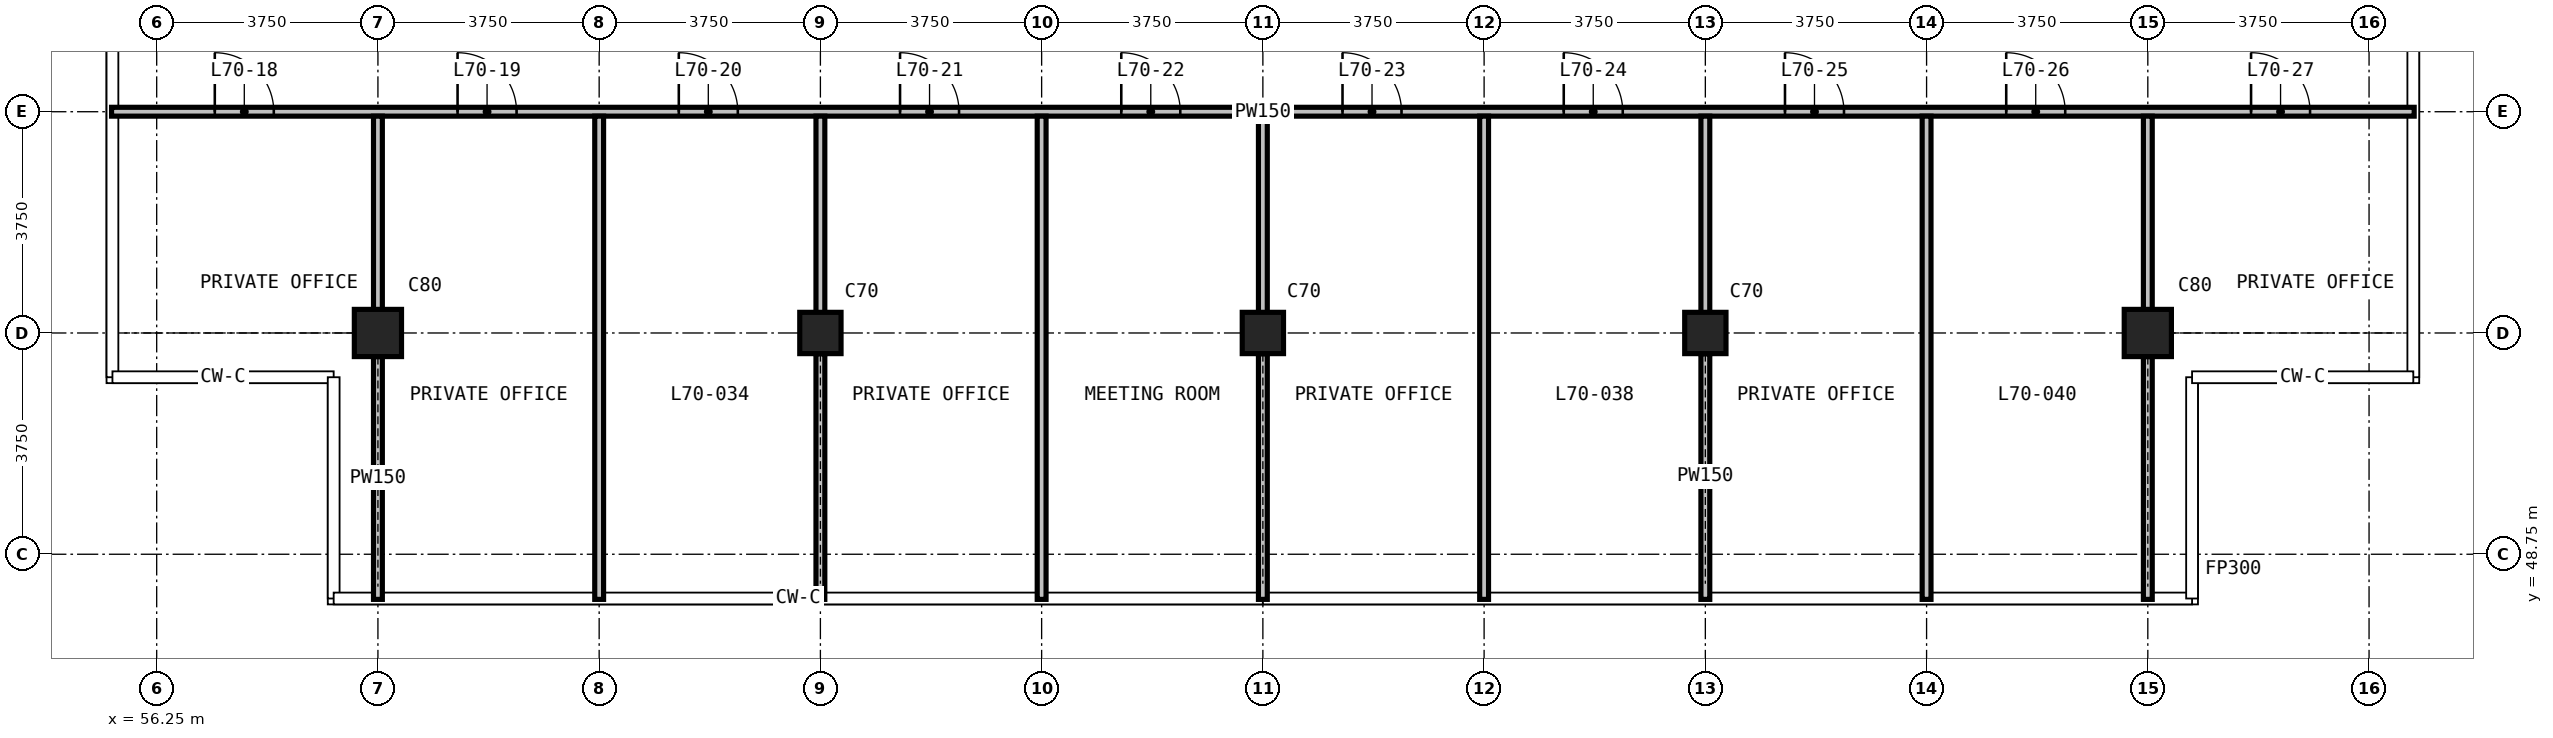
"""IFC4 building model, lengths in metres.
Left out: names, types, materials, properties, quantities, classifications, styles, units other than length and angle.
Written with IfcOpenShell. Run it as: python <this file> out.ifc"""

import sys

from ifc_helpers import new_model, si_unit, direction, frame, frame_2d, origin, origin_2d, place, context, subcontext, project, spatial, rectangle, extrude, element, fill, save


model = new_model("IFC4")
c1 = context("Model", 3, precision=1e-05, world=origin(), true_north=direction((0.0, 1.0)))
c2 = subcontext(c1, "Body", "Model", "MODEL_VIEW")
j1 = project(units=[si_unit("LENGTHUNIT", "METRE"), si_unit("PLANEANGLEUNIT", "RADIAN")], contexts=[c1])
p1 = place(None, origin())
s1 = spatial("IfcSite", under=j1, at=p1, CompositionType="ELEMENT")
p2 = place(p1, origin())
s2 = spatial("IfcBuilding", under=s1, at=p2, CompositionType="ELEMENT")
p3 = place(p2, frame((0.0, 0.0, 269.3)))
s3 = spatial("IfcBuildingStorey", under=s2, at=p3, CompositionType="ELEMENT", Elevation=269.3)
p4 = place(p3, frame((60.0, 52.5, 0.0), z_axis=(0.0, 0.0, 1.0), x_axis=(1.0, 0.0, 0.0)))
e1 = element("IfcColumn", 1, at=p4, inside=s3, PredefinedType="COLUMN", context=c2, shape_type="SweptSolid", body=[
    extrude(rectangle(XDim=0.8, YDim=0.8, at=origin_2d()), origin(), (0.0, 0.0, 1.0), 3.6),
])
for number, where, z_axis, x_axis in (
    (2, (67.5, 52.5, 0.0), (0.0, 0.0, 1.0), (1.0, 0.0, 0.0)),
    (3, (75.0, 52.5, 0.0), (0.0, 0.0, 1.0), (1.0, 0.0, 0.0)),
    (4, (82.5, 52.5, 0.0), (0.0, 0.0, 1.0), (1.0, 0.0, 0.0)),
):
    element("IfcColumn", number, at=place(p3, frame(where, z_axis=z_axis, x_axis=x_axis)), inside=s3, PredefinedType="COLUMN", context=c2, shape_type="SweptSolid", body=[
        extrude(rectangle(XDim=0.7, YDim=0.7, at=origin_2d()), origin(), (0.0, 0.0, 1.0), 3.6),
    ])
p5 = place(p3, frame((90.0, 52.5, 0.0), z_axis=(0.0, 0.0, 1.0), x_axis=(1.0, 0.0, 0.0)))
e5 = element("IfcColumn", 5, at=p5, inside=s3, PredefinedType="COLUMN", context=c2, shape_type="SweptSolid", body=[
    extrude(rectangle(XDim=0.8, YDim=0.8, at=origin_2d()), origin(), (0.0, 0.0, 1.0), 3.6),
])
p6 = place(p3, frame((55.485, 56.25, 0.0), z_axis=(0.0, 0.0, 1.0), x_axis=(1.0, 0.0, 0.0)))
e6 = element("IfcWall", 6, at=p6, inside=s3, PredefinedType="PARTITIONING", context=c2, shape_type="SweptSolid", body=[
    extrude(rectangle(XDim=39.03, YDim=0.15, at=frame_2d((19.515, 0.0))), origin(), (0.0, 0.0, 1.0), 3.3),
])
p7 = place(p6, frame((1.75, 0.0, 0.0)))
e7 = element("IfcOpeningElement", 7, at=p7, cuts=e6, PredefinedType="OPENING", context=c2, shape_type="SweptSolid", body=[
    extrude(rectangle(XDim=1.0, YDim=2.2, at=frame_2d((0.5, 1.1))), frame((0.0, 0.085, 0.0), z_axis=(0.0, -1.0, 0.0), x_axis=(1.0, 0.0, 0.0)), (0.0, 0.0, 1.0), 0.17),
])
p8 = place(p6, frame((5.865, 0.0, 0.0)))
e8 = element("IfcOpeningElement", 8, at=p8, cuts=e6, PredefinedType="OPENING", context=c2, shape_type="SweptSolid", body=[
    extrude(rectangle(XDim=1.0, YDim=2.2, at=frame_2d((0.5, 1.1))), frame((0.0, 0.085, 0.0), z_axis=(0.0, -1.0, 0.0), x_axis=(1.0, 0.0, 0.0)), (0.0, 0.0, 1.0), 0.17),
])
p9 = place(p6, frame((9.615, 0.0, 0.0)))
e9 = element("IfcOpeningElement", 9, at=p9, cuts=e6, PredefinedType="OPENING", context=c2, shape_type="SweptSolid", body=[
    extrude(rectangle(XDim=1.0, YDim=2.2, at=frame_2d((0.5, 1.1))), frame((0.0, 0.085, 0.0), z_axis=(0.0, -1.0, 0.0), x_axis=(1.0, 0.0, 0.0)), (0.0, 0.0, 1.0), 0.17),
])
p10 = place(p6, frame((13.365, 0.0, 0.0)))
e10 = element("IfcOpeningElement", 10, at=p10, cuts=e6, PredefinedType="OPENING", context=c2, shape_type="SweptSolid", body=[
    extrude(rectangle(XDim=1.0, YDim=2.2, at=frame_2d((0.5, 1.1))), frame((0.0, 0.085, 0.0), z_axis=(0.0, -1.0, 0.0), x_axis=(1.0, 0.0, 0.0)), (0.0, 0.0, 1.0), 0.17),
])
p11 = place(p6, frame((17.115, 0.0, 0.0)))
e11 = element("IfcOpeningElement", 11, at=p11, cuts=e6, PredefinedType="OPENING", context=c2, shape_type="SweptSolid", body=[
    extrude(rectangle(XDim=1.0, YDim=2.2, at=frame_2d((0.5, 1.1))), frame((0.0, 0.085, 0.0), z_axis=(0.0, -1.0, 0.0), x_axis=(1.0, 0.0, 0.0)), (0.0, 0.0, 1.0), 0.17),
])
p12 = place(p6, frame((20.865, 0.0, 0.0)))
e12 = element("IfcOpeningElement", 12, at=p12, cuts=e6, PredefinedType="OPENING", context=c2, shape_type="SweptSolid", body=[
    extrude(rectangle(XDim=1.0, YDim=2.2, at=frame_2d((0.5, 1.1))), frame((0.0, 0.085, 0.0), z_axis=(0.0, -1.0, 0.0), x_axis=(1.0, 0.0, 0.0)), (0.0, 0.0, 1.0), 0.17),
])
p13 = place(p6, frame((24.615, 0.0, 0.0)))
e13 = element("IfcOpeningElement", 13, at=p13, cuts=e6, PredefinedType="OPENING", context=c2, shape_type="SweptSolid", body=[
    extrude(rectangle(XDim=1.0, YDim=2.2, at=frame_2d((0.5, 1.1))), frame((0.0, 0.085, 0.0), z_axis=(0.0, -1.0, 0.0), x_axis=(1.0, 0.0, 0.0)), (0.0, 0.0, 1.0), 0.17),
])
p14 = place(p6, frame((28.365, 0.0, 0.0)))
e14 = element("IfcOpeningElement", 14, at=p14, cuts=e6, PredefinedType="OPENING", context=c2, shape_type="SweptSolid", body=[
    extrude(rectangle(XDim=1.0, YDim=2.2, at=frame_2d((0.5, 1.1))), frame((0.0, 0.085, 0.0), z_axis=(0.0, -1.0, 0.0), x_axis=(1.0, 0.0, 0.0)), (0.0, 0.0, 1.0), 0.17),
])
p15 = place(p6, frame((32.115, 0.0, 0.0)))
e15 = element("IfcOpeningElement", 15, at=p15, cuts=e6, PredefinedType="OPENING", context=c2, shape_type="SweptSolid", body=[
    extrude(rectangle(XDim=1.0, YDim=2.2, at=frame_2d((0.5, 1.1))), frame((0.0, 0.085, 0.0), z_axis=(0.0, -1.0, 0.0), x_axis=(1.0, 0.0, 0.0)), (0.0, 0.0, 1.0), 0.17),
])
p16 = place(p6, frame((36.265, 0.0, 0.0)))
e16 = element("IfcOpeningElement", 16, at=p16, cuts=e6, PredefinedType="OPENING", context=c2, shape_type="SweptSolid", body=[
    extrude(rectangle(XDim=1.0, YDim=2.2, at=frame_2d((0.5, 1.1))), frame((0.0, 0.085, 0.0), z_axis=(0.0, -1.0, 0.0), x_axis=(1.0, 0.0, 0.0)), (0.0, 0.0, 1.0), 0.17),
])
p17 = place(p3, frame((60.0, 47.985, 0.0), z_axis=(0.0, 0.0, 1.0), x_axis=(0.0, 1.0, 0.0)))
e17 = element("IfcWall", 17, at=p17, inside=s3, PredefinedType="PARTITIONING", context=c2, shape_type="SweptSolid", body=[
    extrude(rectangle(XDim=4.116, YDim=0.15, at=frame_2d((2.058, 0.0))), origin(), (0.0, 0.0, 1.0), 2.5),
])
p18 = place(p3, frame((60.0, 52.101, 0.0), z_axis=(0.0, 0.0, 1.0), x_axis=(0.0, 1.0, 0.0)))
e18 = element("IfcWall", 18, at=p18, inside=s3, PredefinedType="PARTITIONING", context=c2, shape_type="SweptSolid", body=[
    extrude(rectangle(XDim=4.074, YDim=0.15, at=frame_2d((2.037, 0.0))), origin(), (0.0, 0.0, 1.0), 3.3),
])
p19 = place(p3, frame((63.75, 47.985, 0.0), z_axis=(0.0, 0.0, 1.0), x_axis=(0.0, 1.0, 0.0)))
e19 = element("IfcWall", 19, at=p19, inside=s3, PredefinedType="PARTITIONING", context=c2, shape_type="SweptSolid", body=[
    extrude(rectangle(XDim=8.19, YDim=0.15, at=frame_2d((4.095, 0.0))), origin(), (0.0, 0.0, 1.0), 3.3),
])
p20 = place(p3, frame((67.5, 47.985, 0.0), z_axis=(0.0, 0.0, 1.0), x_axis=(0.0, 1.0, 0.0)))
e20 = element("IfcWall", 20, at=p20, inside=s3, PredefinedType="PARTITIONING", context=c2, shape_type="SweptSolid", body=[
    extrude(rectangle(XDim=4.165, YDim=0.15, at=frame_2d((2.083, 0.0))), origin(), (0.0, 0.0, 1.0), 2.5),
])
p21 = place(p3, frame((67.5, 52.15, 0.0), z_axis=(0.0, 0.0, 1.0), x_axis=(0.0, 1.0, 0.0)))
e21 = element("IfcWall", 21, at=p21, inside=s3, PredefinedType="PARTITIONING", context=c2, shape_type="SweptSolid", body=[
    extrude(rectangle(XDim=4.025, YDim=0.15, at=frame_2d((2.013, 0.0))), origin(), (0.0, 0.0, 1.0), 3.3),
])
p22 = place(p3, frame((71.25, 47.985, 0.0), z_axis=(0.0, 0.0, 1.0), x_axis=(0.0, 1.0, 0.0)))
e22 = element("IfcWall", 22, at=p22, inside=s3, PredefinedType="PARTITIONING", context=c2, shape_type="SweptSolid", body=[
    extrude(rectangle(XDim=8.19, YDim=0.15, at=frame_2d((4.095, 0.0))), origin(), (0.0, 0.0, 1.0), 3.3),
])
p23 = place(p3, frame((75.0, 47.985, 0.0), z_axis=(0.0, 0.0, 1.0), x_axis=(0.0, 1.0, 0.0)))
e23 = element("IfcWall", 23, at=p23, inside=s3, PredefinedType="PARTITIONING", context=c2, shape_type="SweptSolid", body=[
    extrude(rectangle(XDim=4.165, YDim=0.15, at=frame_2d((2.083, 0.0))), origin(), (0.0, 0.0, 1.0), 2.5),
])
p24 = place(p3, frame((75.0, 52.15, 0.0), z_axis=(0.0, 0.0, 1.0), x_axis=(0.0, 1.0, 0.0)))
e24 = element("IfcWall", 24, at=p24, inside=s3, PredefinedType="PARTITIONING", context=c2, shape_type="SweptSolid", body=[
    extrude(rectangle(XDim=4.025, YDim=0.15, at=frame_2d((2.013, 0.0))), origin(), (0.0, 0.0, 1.0), 3.3),
])
p25 = place(p3, frame((78.75, 47.985, 0.0), z_axis=(0.0, 0.0, 1.0), x_axis=(0.0, 1.0, 0.0)))
e25 = element("IfcWall", 25, at=p25, inside=s3, PredefinedType="PARTITIONING", context=c2, shape_type="SweptSolid", body=[
    extrude(rectangle(XDim=8.19, YDim=0.15, at=frame_2d((4.095, 0.0))), origin(), (0.0, 0.0, 1.0), 3.3),
])
p26 = place(p3, frame((82.5, 47.985, 0.0), z_axis=(0.0, 0.0, 1.0), x_axis=(0.0, 1.0, 0.0)))
e26 = element("IfcWall", 26, at=p26, inside=s3, PredefinedType="PARTITIONING", context=c2, shape_type="SweptSolid", body=[
    extrude(rectangle(XDim=4.165, YDim=0.15, at=frame_2d((2.083, 0.0))), origin(), (0.0, 0.0, 1.0), 2.5),
])
p27 = place(p3, frame((82.5, 52.15, 0.0), z_axis=(0.0, 0.0, 1.0), x_axis=(0.0, 1.0, 0.0)))
e27 = element("IfcWall", 27, at=p27, inside=s3, PredefinedType="PARTITIONING", context=c2, shape_type="SweptSolid", body=[
    extrude(rectangle(XDim=4.025, YDim=0.15, at=frame_2d((2.013, 0.0))), origin(), (0.0, 0.0, 1.0), 3.3),
])
p28 = place(p3, frame((86.25, 47.985, 0.0), z_axis=(0.0, 0.0, 1.0), x_axis=(0.0, 1.0, 0.0)))
e28 = element("IfcWall", 28, at=p28, inside=s3, PredefinedType="PARTITIONING", context=c2, shape_type="SweptSolid", body=[
    extrude(rectangle(XDim=8.19, YDim=0.15, at=frame_2d((4.095, 0.0))), origin(), (0.0, 0.0, 1.0), 3.3),
])
p29 = place(p3, frame((90.0, 47.985, 0.0), z_axis=(0.0, 0.0, 1.0), x_axis=(0.0, 1.0, 0.0)))
e29 = element("IfcWall", 29, at=p29, inside=s3, PredefinedType="PARTITIONING", context=c2, shape_type="SweptSolid", body=[
    extrude(rectangle(XDim=4.116, YDim=0.15, at=frame_2d((2.058, 0.0))), origin(), (0.0, 0.0, 1.0), 2.5),
])
p30 = place(p3, frame((90.0, 52.101, 0.0), z_axis=(0.0, 0.0, 1.0), x_axis=(0.0, 1.0, 0.0)))
e30 = element("IfcWall", 30, at=p30, inside=s3, PredefinedType="PARTITIONING", context=c2, shape_type="SweptSolid", body=[
    extrude(rectangle(XDim=4.074, YDim=0.15, at=frame_2d((2.037, 0.0))), origin(), (0.0, 0.0, 1.0), 3.3),
])
p31 = place(p7, origin())
e31 = element("IfcDoor", 31, at=p31, inside=s3, OperationType="SINGLE_SWING_LEFT", PredefinedType="DOOR", context=c2, shape_type="SweptSolid", body=[
    extrude(rectangle(XDim=1.0, YDim=2.2, at=frame_2d((0.5, 1.1))), frame((0.0, 0.025, 0.0), z_axis=(0.0, -1.0, 0.0), x_axis=(1.0, 0.0, 0.0)), (0.0, 0.0, 1.0), 0.05),
])
fill(e7, e31)
p32 = place(p8, origin())
e32 = element("IfcDoor", 32, at=p32, inside=s3, OperationType="SINGLE_SWING_LEFT", PredefinedType="DOOR", context=c2, shape_type="SweptSolid", body=[
    extrude(rectangle(XDim=1.0, YDim=2.2, at=frame_2d((0.5, 1.1))), frame((0.0, 0.025, 0.0), z_axis=(0.0, -1.0, 0.0), x_axis=(1.0, 0.0, 0.0)), (0.0, 0.0, 1.0), 0.05),
])
fill(e8, e32)
p33 = place(p9, origin())
e33 = element("IfcDoor", 33, at=p33, inside=s3, OperationType="SINGLE_SWING_RIGHT", PredefinedType="DOOR", context=c2, shape_type="SweptSolid", body=[
    extrude(rectangle(XDim=1.0, YDim=2.2, at=frame_2d((0.5, 1.1))), frame((0.0, 0.025, 0.0), z_axis=(0.0, -1.0, 0.0), x_axis=(1.0, 0.0, 0.0)), (0.0, 0.0, 1.0), 0.05),
])
fill(e9, e33)
p34 = place(p10, origin())
e34 = element("IfcDoor", 34, at=p34, inside=s3, OperationType="SINGLE_SWING_LEFT", PredefinedType="DOOR", context=c2, shape_type="SweptSolid", body=[
    extrude(rectangle(XDim=1.0, YDim=2.2, at=frame_2d((0.5, 1.1))), frame((0.0, 0.025, 0.0), z_axis=(0.0, -1.0, 0.0), x_axis=(1.0, 0.0, 0.0)), (0.0, 0.0, 1.0), 0.05),
])
fill(e10, e34)
p35 = place(p11, origin())
e35 = element("IfcDoor", 35, at=p35, inside=s3, OperationType="SINGLE_SWING_RIGHT", PredefinedType="DOOR", context=c2, shape_type="SweptSolid", body=[
    extrude(rectangle(XDim=1.0, YDim=2.2, at=frame_2d((0.5, 1.1))), frame((0.0, 0.025, 0.0), z_axis=(0.0, -1.0, 0.0), x_axis=(1.0, 0.0, 0.0)), (0.0, 0.0, 1.0), 0.05),
])
fill(e11, e35)
p36 = place(p12, origin())
e36 = element("IfcDoor", 36, at=p36, inside=s3, OperationType="SINGLE_SWING_RIGHT", PredefinedType="DOOR", context=c2, shape_type="SweptSolid", body=[
    extrude(rectangle(XDim=1.0, YDim=2.2, at=frame_2d((0.5, 1.1))), frame((0.0, 0.025, 0.0), z_axis=(0.0, -1.0, 0.0), x_axis=(1.0, 0.0, 0.0)), (0.0, 0.0, 1.0), 0.05),
])
fill(e12, e36)
p37 = place(p13, origin())
e37 = element("IfcDoor", 37, at=p37, inside=s3, OperationType="SINGLE_SWING_LEFT", PredefinedType="DOOR", context=c2, shape_type="SweptSolid", body=[
    extrude(rectangle(XDim=1.0, YDim=2.2, at=frame_2d((0.5, 1.1))), frame((0.0, 0.025, 0.0), z_axis=(0.0, -1.0, 0.0), x_axis=(1.0, 0.0, 0.0)), (0.0, 0.0, 1.0), 0.05),
])
fill(e13, e37)
p38 = place(p14, origin())
e38 = element("IfcDoor", 38, at=p38, inside=s3, OperationType="SINGLE_SWING_LEFT", PredefinedType="DOOR", context=c2, shape_type="SweptSolid", body=[
    extrude(rectangle(XDim=1.0, YDim=2.2, at=frame_2d((0.5, 1.1))), frame((0.0, 0.025, 0.0), z_axis=(0.0, -1.0, 0.0), x_axis=(1.0, 0.0, 0.0)), (0.0, 0.0, 1.0), 0.05),
])
fill(e14, e38)
p39 = place(p15, origin())
e39 = element("IfcDoor", 39, at=p39, inside=s3, OperationType="SINGLE_SWING_RIGHT", PredefinedType="DOOR", context=c2, shape_type="SweptSolid", body=[
    extrude(rectangle(XDim=1.0, YDim=2.2, at=frame_2d((0.5, 1.1))), frame((0.0, 0.025, 0.0), z_axis=(0.0, -1.0, 0.0), x_axis=(1.0, 0.0, 0.0)), (0.0, 0.0, 1.0), 0.05),
])
fill(e15, e39)
p40 = place(p16, origin())
e40 = element("IfcDoor", 40, at=p40, inside=s3, OperationType="SINGLE_SWING_RIGHT", PredefinedType="DOOR", context=c2, shape_type="SweptSolid", body=[
    extrude(rectangle(XDim=1.0, YDim=2.2, at=frame_2d((0.5, 1.1))), frame((0.0, 0.025, 0.0), z_axis=(0.0, -1.0, 0.0), x_axis=(1.0, 0.0, 0.0)), (0.0, 0.0, 1.0), 0.05),
])
fill(e16, e40)
save(model, sys.argv[1])
